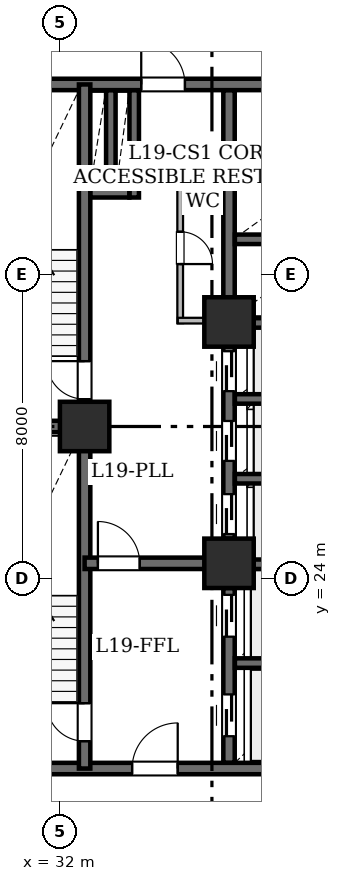
"""IFC4 building model, lengths in metres.
Left out: names, types, materials, properties, quantities, classifications, styles, units other than length and angle.
Written with IfcOpenShell. Run it as: python <this file> out.ifc"""

import sys

from ifc_helpers import new_model, si_unit, direction, frame, frame_2d, origin, origin_2d, place, context, subcontext, project, spatial, rectangle, hollow_rectangle, extrude, element, fill, save


model = new_model("IFC4")
c1 = context("Model", 3, precision=1e-05, world=origin(), true_north=direction((0.0, 1.0)))
c2 = subcontext(c1, "Body", "Model", "MODEL_VIEW")
j1 = project(units=[si_unit("LENGTHUNIT", "METRE"), si_unit("PLANEANGLEUNIT", "RADIAN")], contexts=[c1])
p1 = place(None, origin())
s1 = spatial("IfcSite", under=j1, at=p1, CompositionType="ELEMENT")
p2 = place(p1, origin())
s2 = spatial("IfcBuilding", under=s1, at=p2, CompositionType="ELEMENT")
p3 = place(p2, frame((0.0, 0.0, 77.1)))
s3 = spatial("IfcBuildingStorey", under=s2, at=p3, CompositionType="ELEMENT", Elevation=77.1)
for number, where, z_axis, x_axis in (
    (1, (32.65, 28.0, 0.0), (0.0, 0.0, 1.0), (1.0, 0.0, 0.0)),
    (2, (36.45, 24.4, 0.0), (0.0, 0.0, 1.0), (1.0, 0.0, 0.0)),
    (3, (36.45, 30.75, 0.0), (0.0, 0.0, 1.0), (1.0, 0.0, 0.0)),
):
    element("IfcColumn", number, at=place(p3, frame(where, z_axis=z_axis, x_axis=x_axis)), inside=s3, PredefinedType="COLUMN", context=c2, shape_type="SweptSolid", body=[
        extrude(hollow_rectangle(XDim=1.3, YDim=1.3, WallThickness=0.065, at=origin_2d()), origin(), (0.0, 0.0, 1.0), 3.65),
    ])
p4 = place(p3, frame((29.0, 19.0, 0.0), z_axis=(0.0, 0.0, 1.0), x_axis=(1.0, 0.0, 0.0)))
e4 = element("IfcWall", 4, at=p4, inside=s3, PredefinedType="SHEAR", context=c2, shape_type="SweptSolid", body=[
    extrude(rectangle(XDim=10.4, YDim=0.3, at=frame_2d((5.2, 0.0))), origin(), (0.0, 0.0, 1.0), 3.43),
])
p5 = place(p4, frame((4.9, 0.0, 0.0)))
e5 = element("IfcOpeningElement", 5, at=p5, cuts=e4, PredefinedType="OPENING", context=c2, shape_type="SweptSolid", body=[
    extrude(rectangle(XDim=1.2, YDim=2.15, at=frame_2d((0.6, 1.075))), frame((0.0, 0.16, 0.0), z_axis=(0.0, -1.0, 0.0), x_axis=(1.0, 0.0, 0.0)), (0.0, 0.0, 1.0), 0.32),
])
p6 = place(p3, frame((29.0, 37.0, 0.0), z_axis=(0.0, 0.0, 1.0), x_axis=(1.0, 0.0, 0.0)))
e6 = element("IfcWall", 6, at=p6, inside=s3, PredefinedType="SHEAR", context=c2, shape_type="SweptSolid", body=[
    extrude(rectangle(XDim=10.4, YDim=0.3, at=frame_2d((5.2, 0.0))), origin(), (0.0, 0.0, 1.0), 3.43),
])
p7 = place(p6, frame((5.14, 0.0, 0.0)))
e7 = element("IfcOpeningElement", 7, at=p7, cuts=e6, PredefinedType="OPENING", context=c2, shape_type="SweptSolid", body=[
    extrude(rectangle(XDim=1.15, YDim=2.2, at=frame_2d((0.575, 1.1))), frame((0.0, 0.16, 0.0), z_axis=(0.0, -1.0, 0.0), x_axis=(1.0, 0.0, 0.0)), (0.0, 0.0, 1.0), 0.32),
])
p8 = place(p3, frame((32.65, 19.0, 0.0), z_axis=(0.0, 0.0, 1.0), x_axis=(0.0, 1.0, 0.0)))
e8 = element("IfcWall", 8, at=p8, inside=s3, PredefinedType="SHEAR", context=c2, shape_type="SweptSolid", body=[
    extrude(rectangle(XDim=9.0, YDim=0.3, at=frame_2d((4.5, 0.0))), origin(), (0.0, 0.0, 1.0), 3.43),
])
p9 = place(p8, frame((0.72, 0.0, 0.0)))
e9 = element("IfcOpeningElement", 9, at=p9, cuts=e8, PredefinedType="OPENING", context=c2, shape_type="SweptSolid", body=[
    extrude(rectangle(XDim=1.0, YDim=2.15, at=frame_2d((0.5, 1.075))), frame((0.0, 0.16, 0.0), z_axis=(0.0, -1.0, 0.0), x_axis=(1.0, 0.0, 0.0)), (0.0, 0.0, 1.0), 0.32),
])
p10 = place(p3, frame((32.65, 28.0, 0.0), z_axis=(0.0, 0.0, 1.0), x_axis=(0.0, 1.0, 0.0)))
e10 = element("IfcWall", 10, at=p10, inside=s3, PredefinedType="SHEAR", context=c2, shape_type="SweptSolid", body=[
    extrude(rectangle(XDim=9.0, YDim=0.3, at=frame_2d((4.5, 0.0))), origin(), (0.0, 0.0, 1.0), 3.43),
])
p11 = place(p10, frame((0.72, 0.0, 0.0)))
e11 = element("IfcOpeningElement", 11, at=p11, cuts=e10, PredefinedType="OPENING", context=c2, shape_type="SweptSolid", body=[
    extrude(rectangle(XDim=1.0, YDim=2.15, at=frame_2d((0.5, 1.075))), frame((0.0, 0.16, 0.0), z_axis=(0.0, -1.0, 0.0), x_axis=(1.0, 0.0, 0.0)), (0.0, 0.0, 1.0), 0.32),
])
p12 = place(p3, frame((29.0, 28.0, 0.0), z_axis=(0.0, 0.0, 1.0), x_axis=(1.0, 0.0, 0.0)))
e12 = element("IfcWall", 12, at=p12, inside=s3, PredefinedType="SHEAR", context=c2, shape_type="SweptSolid", body=[
    extrude(rectangle(XDim=3.65, YDim=0.3, at=frame_2d((1.825, 0.0))), origin(), (0.0, 0.0, 1.0), 3.43),
])
p13 = place(p3, frame((32.65, 24.4, 0.0), z_axis=(0.0, 0.0, 1.0), x_axis=(1.0, 0.0, 0.0)))
e13 = element("IfcWall", 13, at=p13, inside=s3, PredefinedType="SHEAR", context=c2, shape_type="SweptSolid", body=[
    extrude(rectangle(XDim=3.8, YDim=0.3, at=frame_2d((1.9, 0.0))), origin(), (0.0, 0.0, 1.0), 3.43),
])
p14 = place(p13, frame((0.35, 0.0, 0.0)))
e14 = element("IfcOpeningElement", 14, at=p14, cuts=e13, PredefinedType="OPENING", context=c2, shape_type="SweptSolid", body=[
    extrude(rectangle(XDim=1.1, YDim=2.15, at=frame_2d((0.55, 1.075))), frame((0.0, 0.16, 0.0), z_axis=(0.0, -1.0, 0.0), x_axis=(1.0, 0.0, 0.0)), (0.0, 0.0, 1.0), 0.32),
])
p15 = place(p3, frame((36.45, 19.154, 0.0), z_axis=(0.0, 0.0, 1.0), x_axis=(0.0, 1.0, 0.0)))
e15 = element("IfcWall", 15, at=p15, inside=s3, PredefinedType="SHEAR", context=c2, shape_type="SweptSolid", body=[
    extrude(rectangle(XDim=4.596, YDim=0.3, at=frame_2d((2.298, 0.0))), origin(), (0.0, 0.0, 1.0), 3.43),
])
p16 = place(p15, frame((0.696, 0.0, 0.0)))
e16 = element("IfcOpeningElement", 16, at=p16, cuts=e15, PredefinedType="OPENING", context=c2, shape_type="SweptSolid", body=[
    extrude(rectangle(XDim=1.1, YDim=2.15, at=frame_2d((0.55, 1.075))), frame((0.0, 0.16, 0.0), z_axis=(0.0, -1.0, 0.0), x_axis=(1.0, 0.0, 0.0)), (0.0, 0.0, 1.0), 0.32),
])
p17 = place(p15, frame((3.316, 0.0, 0.0)))
e17 = element("IfcOpeningElement", 17, at=p17, cuts=e15, PredefinedType="OPENING", context=c2, shape_type="SweptSolid", body=[
    extrude(rectangle(XDim=1.1, YDim=2.15, at=frame_2d((0.55, 1.075))), frame((0.0, 0.16, 0.0), z_axis=(0.0, -1.0, 0.0), x_axis=(1.0, 0.0, 0.0)), (0.0, 0.0, 1.0), 0.32),
])
p18 = place(p3, frame((36.45, 25.05, 0.0), z_axis=(0.0, 0.0, 1.0), x_axis=(0.0, 1.0, 0.0)))
e18 = element("IfcWall", 18, at=p18, inside=s3, PredefinedType="SHEAR", context=c2, shape_type="SweptSolid", body=[
    extrude(rectangle(XDim=5.05, YDim=0.3, at=frame_2d((2.525, 0.0))), origin(), (0.0, 0.0, 1.0), 3.43),
])
p19 = place(p18, frame((0.12, 0.0, 0.0)))
e19 = element("IfcOpeningElement", 19, at=p19, cuts=e18, PredefinedType="OPENING", context=c2, shape_type="SweptSolid", body=[
    extrude(rectangle(XDim=1.05, YDim=2.15, at=frame_2d((0.525, 1.075))), frame((0.0, 0.16, 0.0), z_axis=(0.0, -1.0, 0.0), x_axis=(1.0, 0.0, 0.0)), (0.0, 0.0, 1.0), 0.32),
])
p20 = place(p18, frame((2.045, 0.0, 0.0)))
e20 = element("IfcOpeningElement", 20, at=p20, cuts=e18, PredefinedType="OPENING", context=c2, shape_type="SweptSolid", body=[
    extrude(rectangle(XDim=1.05, YDim=2.15, at=frame_2d((0.525, 1.075))), frame((0.0, 0.16, 0.0), z_axis=(0.0, -1.0, 0.0), x_axis=(1.0, 0.0, 0.0)), (0.0, 0.0, 1.0), 0.32),
])
p21 = place(p18, frame((3.88, 0.0, 0.0)))
e21 = element("IfcOpeningElement", 21, at=p21, cuts=e18, PredefinedType="OPENING", context=c2, shape_type="SweptSolid", body=[
    extrude(rectangle(XDim=1.05, YDim=2.15, at=frame_2d((0.525, 1.075))), frame((0.0, 0.16, 0.0), z_axis=(0.0, -1.0, 0.0), x_axis=(1.0, 0.0, 0.0)), (0.0, 0.0, 1.0), 0.32),
])
p22 = place(p3, frame((36.45, 31.4, 0.0), z_axis=(0.0, 0.0, 1.0), x_axis=(0.0, 1.0, 0.0)))
e22 = element("IfcWall", 22, at=p22, inside=s3, PredefinedType="SHEAR", context=c2, shape_type="SweptSolid", body=[
    extrude(rectangle(XDim=5.446, YDim=0.3, at=frame_2d((2.723, 0.0))), origin(), (0.0, 0.0, 1.0), 3.43),
])
for number, where, z_axis, x_axis in (
    (23, (36.604, 21.775, 0.0), (0.0, 0.0, 1.0), (1.0, 0.0, 0.0)),
    (24, (36.604, 24.375, 0.0), (0.0, 0.0, 1.0), (1.0, 0.0, 0.0)),
    (25, (36.604, 26.625, 0.0), (0.0, 0.0, 1.0), (1.0, 0.0, 0.0)),
    (26, (36.604, 28.725, 0.0), (0.0, 0.0, 1.0), (1.0, 0.0, 0.0)),
    (27, (36.604, 30.725, 0.0), (0.0, 0.0, 1.0), (1.0, 0.0, 0.0)),
    (28, (36.604, 32.925, 0.0), (0.0, 0.0, 1.0), (1.0, 0.0, 0.0)),
    (29, (36.604, 34.975, 0.0), (0.0, 0.0, 1.0), (1.0, 0.0, 0.0)),
):
    element("IfcWall", number, at=place(p3, frame(where, z_axis=z_axis, x_axis=x_axis)), inside=s3, PredefinedType="SHEAR", context=c2, shape_type="SweptSolid", body=[
        extrude(rectangle(XDim=2.642, YDim=0.25, at=frame_2d((1.321, 0.0))), origin(), (0.0, 0.0, 1.0), 3.43),
    ])
p23 = place(p3, frame((33.955, 34.025, 0.0), z_axis=(0.0, 0.0, 1.0), x_axis=(0.0, 1.0, 0.0)))
e30 = element("IfcWall", 30, at=p23, inside=s3, PredefinedType="SHEAR", context=c2, shape_type="SweptSolid", body=[
    extrude(rectangle(XDim=2.821, YDim=0.25, at=frame_2d((1.411, 0.0))), origin(), (0.0, 0.0, 1.0), 3.43),
])
p24 = place(p3, frame((32.804, 34.15, 0.0), z_axis=(0.0, 0.0, 1.0), x_axis=(1.0, 0.0, 0.0)))
e31 = element("IfcWall", 31, at=p24, inside=s3, PredefinedType="SHEAR", context=c2, shape_type="SweptSolid", body=[
    extrude(rectangle(XDim=1.022, YDim=0.25, at=frame_2d((0.511, 0.0))), origin(), (0.0, 0.0, 1.0), 3.43),
])
p25 = place(p3, frame((33.34, 34.279, 0.0), z_axis=(0.0, 0.0, 1.0), x_axis=(0.0, 1.0, 0.0)))
e32 = element("IfcWall", 32, at=p25, inside=s3, PredefinedType="SHEAR", context=c2, shape_type="SweptSolid", body=[
    extrude(rectangle(XDim=2.567, YDim=0.25, at=frame_2d((1.283, 0.0))), origin(), (0.0, 0.0, 1.0), 3.43),
])
p26 = place(p3, frame((36.306, 34.615, 0.0), z_axis=(0.0, 0.0, 1.0), x_axis=(-1.0, 0.0, 0.0)))
e33 = element("IfcWall", 33, at=p26, inside=s3, PredefinedType="STANDARD", context=c2, shape_type="SweptSolid", body=[
    extrude(rectangle(XDim=1.206, YDim=0.15, at=frame_2d((0.603, 0.0))), origin(), (0.0, 0.0, 1.0), 3.43),
])
p27 = place(p3, frame((35.165, 34.678, 0.0), z_axis=(0.0, 0.0, 1.0), x_axis=(0.0, -1.0, 0.0)))
e34 = element("IfcWall", 34, at=p27, inside=s3, PredefinedType="STANDARD", context=c2, shape_type="SweptSolid", body=[
    extrude(rectangle(XDim=3.958, YDim=0.15, at=frame_2d((1.979, 0.0))), origin(), (0.0, 0.0, 1.0), 3.43),
])
p28 = place(p27, frame((1.554, 0.0, 0.0)))
e35 = element("IfcOpeningElement", 35, at=p28, cuts=e34, PredefinedType="OPENING", context=c2, shape_type="SweptSolid", body=[
    extrude(rectangle(XDim=0.85, YDim=2.1, at=frame_2d((0.425, 1.05))), frame((0.0, 0.085, 0.0), z_axis=(0.0, -1.0, 0.0), x_axis=(1.0, 0.0, 0.0)), (0.0, 0.0, 1.0), 0.17),
])
p29 = place(p3, frame((35.102, 30.785, 0.0), z_axis=(0.0, 0.0, 1.0), x_axis=(1.0, 0.0, 0.0)))
e36 = element("IfcWall", 36, at=p29, inside=s3, PredefinedType="STANDARD", context=c2, shape_type="SweptSolid", body=[
    extrude(rectangle(XDim=1.198, YDim=0.15, at=frame_2d((0.599, 0.0))), origin(), (0.0, 0.0, 1.0), 3.43),
])
p30 = place(p9, origin())
e37 = element("IfcDoor", 37, at=p30, inside=s3, OperationType="SINGLE_SWING_RIGHT", PredefinedType="DOOR", context=c2, shape_type="SweptSolid", body=[
    extrude(rectangle(XDim=1.0, YDim=2.15, at=frame_2d((0.5, 1.075))), frame((0.0, 0.025, 0.0), z_axis=(0.0, -1.0, 0.0), x_axis=(1.0, 0.0, 0.0)), (0.0, 0.0, 1.0), 0.05),
])
fill(e9, e37)
p31 = place(p11, origin())
e38 = element("IfcDoor", 38, at=p31, inside=s3, OperationType="SINGLE_SWING_RIGHT", PredefinedType="DOOR", context=c2, shape_type="SweptSolid", body=[
    extrude(rectangle(XDim=1.0, YDim=2.15, at=frame_2d((0.5, 1.075))), frame((0.0, 0.025, 0.0), z_axis=(0.0, -1.0, 0.0), x_axis=(1.0, 0.0, 0.0)), (0.0, 0.0, 1.0), 0.05),
])
fill(e11, e38)
p32 = place(p14, origin())
e39 = element("IfcDoor", 39, at=p32, inside=s3, OperationType="SINGLE_SWING_LEFT", PredefinedType="DOOR", context=c2, shape_type="SweptSolid", body=[
    extrude(rectangle(XDim=1.1, YDim=2.15, at=frame_2d((0.55, 1.075))), frame((0.0, 0.025, 0.0), z_axis=(0.0, -1.0, 0.0), x_axis=(1.0, 0.0, 0.0)), (0.0, 0.0, 1.0), 0.05),
])
fill(e14, e39)
p33 = place(p5, origin())
e40 = element("IfcDoor", 40, at=p33, inside=s3, OperationType="SINGLE_SWING_RIGHT", PredefinedType="DOOR", context=c2, shape_type="SweptSolid", body=[
    extrude(rectangle(XDim=1.2, YDim=2.15, at=frame_2d((0.6, 1.075))), frame((0.0, 0.025, 0.0), z_axis=(0.0, -1.0, 0.0), x_axis=(1.0, 0.0, 0.0)), (0.0, 0.0, 1.0), 0.05),
])
fill(e5, e40)
p34 = place(p7, origin())
e41 = element("IfcDoor", 41, at=p34, inside=s3, OperationType="SINGLE_SWING_LEFT", PredefinedType="DOOR", context=c2, shape_type="SweptSolid", body=[
    extrude(rectangle(XDim=1.15, YDim=2.2, at=frame_2d((0.575, 1.1))), frame((0.0, 0.025, 0.0), z_axis=(0.0, -1.0, 0.0), x_axis=(1.0, 0.0, 0.0)), (0.0, 0.0, 1.0), 0.05),
])
fill(e7, e41)
p35 = place(p16, origin())
e42 = element("IfcDoor", 42, at=p35, inside=s3, OperationType="SLIDING_TO_LEFT", PredefinedType="DOOR", context=c2, shape_type="SweptSolid", body=[
    extrude(rectangle(XDim=1.1, YDim=2.15, at=frame_2d((0.55, 1.075))), frame((0.0, 0.025, 0.0), z_axis=(0.0, -1.0, 0.0), x_axis=(1.0, 0.0, 0.0)), (0.0, 0.0, 1.0), 0.05),
])
fill(e16, e42)
p36 = place(p17, origin())
e43 = element("IfcDoor", 43, at=p36, inside=s3, OperationType="SLIDING_TO_LEFT", PredefinedType="DOOR", context=c2, shape_type="SweptSolid", body=[
    extrude(rectangle(XDim=1.1, YDim=2.15, at=frame_2d((0.55, 1.075))), frame((0.0, 0.025, 0.0), z_axis=(0.0, -1.0, 0.0), x_axis=(1.0, 0.0, 0.0)), (0.0, 0.0, 1.0), 0.05),
])
fill(e17, e43)
p37 = place(p19, origin())
e44 = element("IfcDoor", 44, at=p37, inside=s3, OperationType="SLIDING_TO_LEFT", PredefinedType="DOOR", context=c2, shape_type="SweptSolid", body=[
    extrude(rectangle(XDim=1.05, YDim=2.15, at=frame_2d((0.525, 1.075))), frame((0.0, 0.025, 0.0), z_axis=(0.0, -1.0, 0.0), x_axis=(1.0, 0.0, 0.0)), (0.0, 0.0, 1.0), 0.05),
])
fill(e19, e44)
p38 = place(p20, origin())
e45 = element("IfcDoor", 45, at=p38, inside=s3, OperationType="SLIDING_TO_LEFT", PredefinedType="DOOR", context=c2, shape_type="SweptSolid", body=[
    extrude(rectangle(XDim=1.05, YDim=2.15, at=frame_2d((0.525, 1.075))), frame((0.0, 0.025, 0.0), z_axis=(0.0, -1.0, 0.0), x_axis=(1.0, 0.0, 0.0)), (0.0, 0.0, 1.0), 0.05),
])
fill(e20, e45)
p39 = place(p21, origin())
e46 = element("IfcDoor", 46, at=p39, inside=s3, OperationType="SLIDING_TO_LEFT", PredefinedType="DOOR", context=c2, shape_type="SweptSolid", body=[
    extrude(rectangle(XDim=1.05, YDim=2.15, at=frame_2d((0.525, 1.075))), frame((0.0, 0.025, 0.0), z_axis=(0.0, -1.0, 0.0), x_axis=(1.0, 0.0, 0.0)), (0.0, 0.0, 1.0), 0.05),
])
fill(e21, e46)
p40 = place(p28, origin())
e47 = element("IfcDoor", 47, at=p40, inside=s3, OperationType="SINGLE_SWING_RIGHT", PredefinedType="DOOR", context=c2, shape_type="SweptSolid", body=[
    extrude(rectangle(XDim=0.85, YDim=2.1, at=frame_2d((0.425, 1.05))), frame((0.0, 0.025, 0.0), z_axis=(0.0, -1.0, 0.0), x_axis=(1.0, 0.0, 0.0)), (0.0, 0.0, 1.0), 0.05),
])
fill(e35, e47)
save(model, sys.argv[1])
